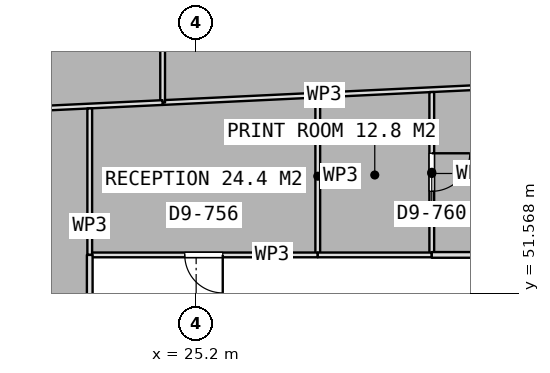
"""IFC4 building model, lengths in metres.
Left out: names, types, materials, properties, quantities, classifications, styles, units other than length and angle.
Written with IfcOpenShell. Run it as: python <this file> out.ifc"""

import sys

from ifc_helpers import new_model, si_unit, direction, frame, frame_2d, origin, place, context, subcontext, project, spatial, rectangle, extrude, element, fill, save


model = new_model("IFC4")
c1 = context("Model", 3, precision=1e-05, world=origin(), true_north=direction((0.0, 1.0)))
c2 = subcontext(c1, "Body", "Model", "MODEL_VIEW")
j1 = project(units=[si_unit("LENGTHUNIT", "METRE"), si_unit("PLANEANGLEUNIT", "RADIAN")], contexts=[c1])
p1 = place(None, origin())
s1 = spatial("IfcSite", under=j1, at=p1, CompositionType="ELEMENT")
p2 = place(p1, origin())
s2 = spatial("IfcBuilding", under=s1, at=p2, CompositionType="ELEMENT")
p3 = place(p2, frame((0.0, 0.0, 187.7)))
s3 = spatial("IfcBuildingStorey", under=s2, at=p3, CompositionType="ELEMENT", Elevation=187.7)
p4 = place(p3, frame((32.824, 56.991, 0.0), z_axis=(0.0, 0.0, 1.0), x_axis=(-0.998857279552, -0.047792625861, 0.0)))
e1 = element("IfcWall", 1, at=p4, inside=s3, PredefinedType="PARTITIONING", context=c2, shape_type="SweptSolid", body=[
    extrude(rectangle(XDim=8.516, YDim=0.125, at=frame_2d((4.258, 0.0))), origin(), (0.0, 0.0, 1.0), 3.5),
])
p5 = place(p3, frame((24.318, 56.584, 0.0), z_axis=(0.0, 0.0, 1.0), x_axis=(0.0, 1.0, 0.0)))
e2 = element("IfcWall", 2, at=p5, inside=s3, PredefinedType="PARTITIONING", context=c2, shape_type="SweptSolid", body=[
    extrude(rectangle(XDim=4.426, YDim=0.125, at=frame_2d((2.213, 0.0))), origin(), (0.0, 0.0, 1.0), 3.5),
])
p6 = place(p5, frame((3.013, 0.0, 0.0)))
e3 = element("IfcOpeningElement", 3, at=p6, cuts=e2, PredefinedType="OPENING", context=c2, shape_type="SweptSolid", body=[
    extrude(rectangle(XDim=1.0, YDim=2.1, at=frame_2d((0.5, 1.05))), frame((0.0, 0.073, 0.0), z_axis=(0.0, -1.0, 0.0), x_axis=(1.0, 0.0, 0.0)), (0.0, 0.0, 1.0), 0.145),
])
p7 = place(p3, frame((24.317, 56.584, 0.0), z_axis=(0.0, 0.0, 1.0), x_axis=(-0.998859973319, -0.047736293327, 0.0)))
e4 = element("IfcWall", 4, at=p7, inside=s3, PredefinedType="PARTITIONING", context=c2, shape_type="SweptSolid", body=[
    extrude(rectangle(XDim=8.336, YDim=0.125, at=frame_2d((4.168, 0.0))), origin(), (0.0, 0.0, 1.0), 3.5),
])
p8 = place(p7, frame((3.668, 0.0, 0.0)))
e5 = element("IfcOpeningElement", 5, at=p8, cuts=e4, PredefinedType="OPENING", context=c2, shape_type="SweptSolid", body=[
    extrude(rectangle(XDim=1.0, YDim=2.1, at=frame_2d((0.5, 1.05))), frame((0.0, 0.073, 0.0), z_axis=(0.0, -1.0, 0.0), x_axis=(1.0, 0.0, 0.0)), (0.0, 0.0, 1.0), 0.145),
])
p9 = place(p3, frame((28.4, 56.717, 0.0), z_axis=(0.0, 0.0, 1.0), x_axis=(0.0, -1.0, 0.0)))
e6 = element("IfcWall", 6, at=p9, inside=s3, PredefinedType="PARTITIONING", context=c2, shape_type="SweptSolid", body=[
    extrude(rectangle(XDim=4.142, YDim=0.125, at=frame_2d((2.071, 0.0))), origin(), (0.0, 0.0, 1.0), 3.5),
])
p10 = place(p3, frame((28.4, 52.575, 0.0), z_axis=(0.0, 0.0, 1.0), x_axis=(-1.0, 0.0, 0.0)))
e7 = element("IfcWall", 7, at=p10, inside=s3, PredefinedType="PARTITIONING", context=c2, shape_type="SweptSolid", body=[
    extrude(rectangle(XDim=6.0, YDim=0.125, at=frame_2d((3.0, 0.0))), origin(), (0.0, 0.0, 1.0), 3.5),
])
p11 = place(p10, frame((2.5, 0.0, 0.0)))
e8 = element("IfcOpeningElement", 8, at=p11, cuts=e7, PredefinedType="OPENING", context=c2, shape_type="SweptSolid", body=[
    extrude(rectangle(XDim=1.0, YDim=2.1, at=frame_2d((0.5, 1.05))), frame((0.0, 0.073, 0.0), z_axis=(0.0, -1.0, 0.0), x_axis=(1.0, 0.0, 0.0)), (0.0, 0.0, 1.0), 0.145),
])
p12 = place(p3, frame((22.4, 52.575, 0.0), z_axis=(0.0, 0.0, 1.0), x_axis=(0.0, 1.0, 0.0)))
e9 = element("IfcWall", 9, at=p12, inside=s3, PredefinedType="PARTITIONING", context=c2, shape_type="SweptSolid", body=[
    extrude(rectangle(XDim=3.855, YDim=0.125, at=frame_2d((1.927, 0.0))), origin(), (0.0, 0.0, 1.0), 3.5),
])
p13 = place(p3, frame((31.4, 56.86, 0.0), z_axis=(0.0, 0.0, 1.0), x_axis=(0.0, -1.0, 0.0)))
e10 = element("IfcWall", 10, at=p13, inside=s3, PredefinedType="PARTITIONING", context=c2, shape_type="SweptSolid", body=[
    extrude(rectangle(XDim=4.285, YDim=0.125, at=frame_2d((2.143, 0.0))), origin(), (0.0, 0.0, 1.0), 3.5),
])
p14 = place(p13, frame((1.611, 0.0, 0.0)))
e11 = element("IfcOpeningElement", 11, at=p14, cuts=e10, PredefinedType="OPENING", context=c2, shape_type="SweptSolid", body=[
    extrude(rectangle(XDim=1.0, YDim=2.1, at=frame_2d((0.5, 1.05))), frame((0.0, 0.073, 0.0), z_axis=(0.0, -1.0, 0.0), x_axis=(1.0, 0.0, 0.0)), (0.0, 0.0, 1.0), 0.145),
])
p15 = place(p3, frame((31.4, 52.575, 0.0), z_axis=(0.0, 0.0, 1.0), x_axis=(-1.0, 0.0, 0.0)))
e12 = element("IfcWall", 12, at=p15, inside=s3, PredefinedType="PARTITIONING", context=c2, shape_type="SweptSolid", body=[
    extrude(rectangle(XDim=3.0, YDim=0.125, at=frame_2d((1.5, 0.0))), origin(), (0.0, 0.0, 1.0), 3.5),
])
p16 = place(p3, frame((53.2, 52.575, 0.0), z_axis=(0.0, 0.0, 1.0), x_axis=(-1.0, 0.0, 0.0)))
e13 = element("IfcWall", 13, at=p16, inside=s3, PredefinedType="PARTITIONING", context=c2, shape_type="SweptSolid", body=[
    extrude(rectangle(XDim=21.8, YDim=0.15, at=frame_2d((10.9, 0.0))), origin(), (0.0, 0.0, 1.0), 3.5),
])
p17 = place(p16, frame((10.4, 0.0, 0.0)))
e14 = element("IfcOpeningElement", 14, at=p17, cuts=e13, PredefinedType="OPENING", context=c2, shape_type="SweptSolid", body=[
    extrude(rectangle(XDim=1.0, YDim=2.1, at=frame_2d((0.5, 1.05))), frame((0.0, 0.085, 0.0), z_axis=(0.0, -1.0, 0.0), x_axis=(1.0, 0.0, 0.0)), (0.0, 0.0, 1.0), 0.17),
])
p18 = place(p3, frame((22.4, 52.575, 0.0), z_axis=(0.0, 0.0, 1.0), x_axis=(0.0, -1.0, 0.0)))
e15 = element("IfcWall", 15, at=p18, inside=s3, PredefinedType="PARTITIONING", context=c2, shape_type="SweptSolid", body=[
    extrude(rectangle(XDim=24.5, YDim=0.15, at=frame_2d((12.25, 0.0))), origin(), (0.0, 0.0, 1.0), 3.5),
])
p19 = place(p18, frame((11.788, 0.0, 0.0)))
e16 = element("IfcOpeningElement", 16, at=p19, cuts=e15, PredefinedType="OPENING", context=c2, shape_type="SweptSolid", body=[
    extrude(rectangle(XDim=1.0, YDim=2.1, at=frame_2d((0.5, 1.05))), frame((0.0, 0.085, 0.0), z_axis=(0.0, -1.0, 0.0), x_axis=(1.0, 0.0, 0.0)), (0.0, 0.0, 1.0), 0.17),
])
p20 = place(p11, origin())
e17 = element("IfcDoor", 17, at=p20, inside=s3, OperationType="SINGLE_SWING_LEFT", PredefinedType="DOOR", context=c2, shape_type="SweptSolid", body=[
    extrude(rectangle(XDim=1.0, YDim=2.1, at=frame_2d((0.5, 1.05))), frame((0.0, 0.025, 0.0), z_axis=(0.0, -1.0, 0.0), x_axis=(1.0, 0.0, 0.0)), (0.0, 0.0, 1.0), 0.05),
])
fill(e8, e17)
p21 = place(p14, origin())
e18 = element("IfcDoor", 18, at=p21, inside=s3, OperationType="SINGLE_SWING_LEFT", PredefinedType="DOOR", context=c2, shape_type="SweptSolid", body=[
    extrude(rectangle(XDim=1.0, YDim=2.1, at=frame_2d((0.5, 1.05))), frame((0.0, 0.025, 0.0), z_axis=(0.0, -1.0, 0.0), x_axis=(1.0, 0.0, 0.0)), (0.0, 0.0, 1.0), 0.05),
])
fill(e11, e18)
save(model, sys.argv[1])
